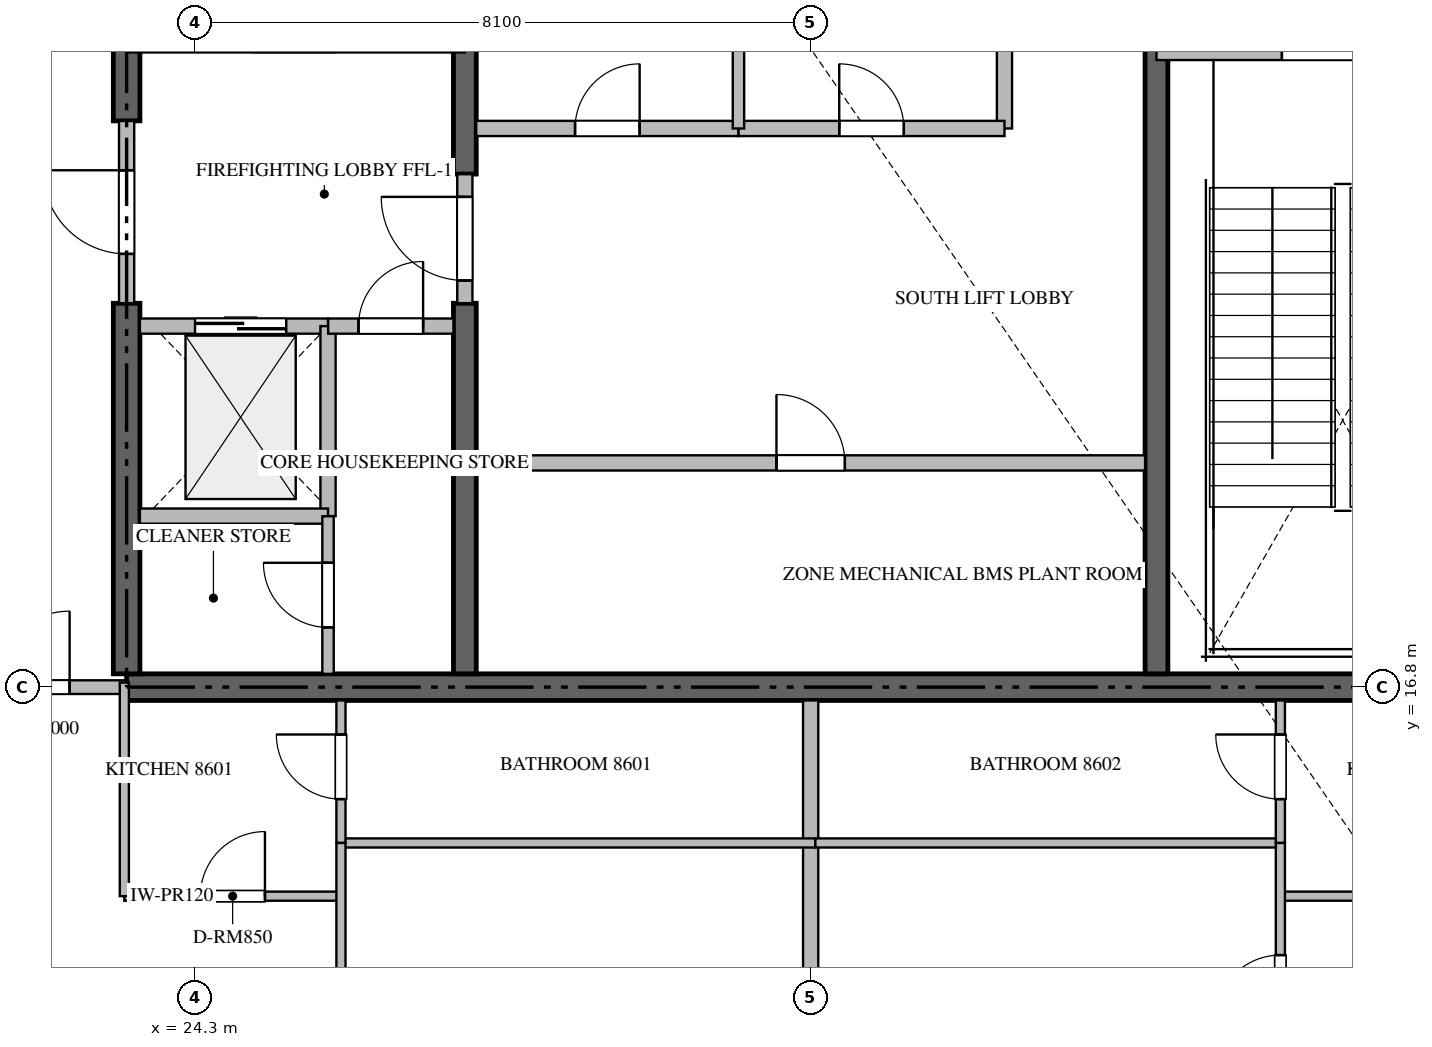
"""IFC4 building model, lengths in metres.
Left out: names, types, materials, properties, quantities, classifications, styles, units other than length and angle.
Written with IfcOpenShell. Run it as: python <this file> out.ifc"""

import sys

from ifc_helpers import new_model, si_unit, direction, frame, frame_2d, origin, place, context, subcontext, project, spatial, rectangle, extrude, source, transform, mapped, element, fill, save


model = new_model("IFC4")
c1 = context("Model", 3, precision=1e-05, world=origin(), true_north=direction((0.0, 1.0)))
c2 = subcontext(c1, "Body", "Model", "MODEL_VIEW")
j1 = project(units=[si_unit("LENGTHUNIT", "METRE"), si_unit("PLANEANGLEUNIT", "RADIAN")], contexts=[c1])
p1 = place(None, origin())
s1 = spatial("IfcSite", under=j1, at=p1, CompositionType="ELEMENT")
p2 = place(p1, origin())
s2 = spatial("IfcBuilding", under=s1, at=p2, CompositionType="ELEMENT")
p3 = place(p2, frame((0.0, 0.0, 347.95)))
s3 = spatial("IfcBuildingStorey", under=s2, at=p3, CompositionType="ELEMENT", Elevation=347.95)
p4 = place(p3, frame((23.4, 16.8, -0.26), z_axis=(0.0, 0.0, 1.0), x_axis=(1.0, 0.0, 0.0)))
e1 = element("IfcWall", 1, at=p4, inside=s3, PredefinedType="SHEAR", context=c2, shape_type="SweptSolid", body=[
    extrude(rectangle(XDim=18.0, YDim=0.35, at=frame_2d((9.0, 0.0))), origin(), (0.0, 0.0, 1.0), 5.898),
])
p5 = place(p3, frame((23.4, 16.975, -0.26), z_axis=(0.0, 0.0, 1.0), x_axis=(0.0, 1.0, 0.0)))
e2 = element("IfcWall", 2, at=p5, inside=s3, PredefinedType="SHEAR", context=c2, shape_type="SweptSolid", body=[
    extrude(rectangle(XDim=4.875, YDim=0.35, at=frame_2d((2.438, 0.0))), origin(), (0.0, 0.0, 1.0), 5.898),
])
p6 = place(p3, frame((23.4, 24.25, -0.26), z_axis=(0.0, 0.0, 1.0), x_axis=(0.0, 1.0, 0.0)))
e3 = element("IfcWall", 3, at=p6, inside=s3, PredefinedType="SHEAR", context=c2, shape_type="SweptSolid", body=[
    extrude(rectangle(XDim=9.175, YDim=0.35, at=frame_2d((4.587, 0.0))), origin(), (0.0, 0.0, 1.0), 5.898),
])
p7 = place(p3, frame((27.85, 16.975, -0.26), z_axis=(0.0, 0.0, 1.0), x_axis=(0.0, 1.0, 0.0)))
e4 = element("IfcWall", 4, at=p7, inside=s3, PredefinedType="SHEAR", context=c2, shape_type="SweptSolid", body=[
    extrude(rectangle(XDim=4.875, YDim=0.3, at=frame_2d((2.438, 0.0))), origin(), (0.0, 0.0, 1.0), 5.898),
])
p8 = place(p3, frame((27.85, 23.55, -0.26), z_axis=(0.0, 0.0, 1.0), x_axis=(0.0, 1.0, 0.0)))
e5 = element("IfcWall", 5, at=p8, inside=s3, PredefinedType="SHEAR", context=c2, shape_type="SweptSolid", body=[
    extrude(rectangle(XDim=9.875, YDim=0.3, at=frame_2d((4.938, 0.0))), origin(), (0.0, 0.0, 1.0), 5.898),
])
p9 = place(p3, frame((36.95, 16.975, -0.26), z_axis=(0.0, 0.0, 1.0), x_axis=(0.0, 1.0, 0.0)))
e6 = element("IfcWall", 6, at=p9, inside=s3, PredefinedType="SHEAR", context=c2, shape_type="SweptSolid", body=[
    extrude(rectangle(XDim=8.375, YDim=0.3, at=frame_2d((4.188, 0.0))), origin(), (0.0, 0.0, 1.0), 5.898),
])
p10 = place(p3, frame((36.95, 25.15, 0.0), z_axis=(0.0, 0.0, 1.0), x_axis=(1.0, 0.0, 0.0)))
e7 = element("IfcWall", 7, at=p10, inside=s3, PredefinedType="STANDARD", context=c2, shape_type="SweptSolid", body=[
    extrude(rectangle(XDim=4.45, YDim=0.2, at=frame_2d((2.225, 0.0))), origin(), (0.0, 0.0, 1.0), 5.64),
])
p11 = place(p10, frame((1.65, 0.0, 0.0)))
e8 = element("IfcOpeningElement", 8, at=p11, cuts=e7, PredefinedType="OPENING", context=c2, shape_type="SweptSolid", body=[
    extrude(rectangle(XDim=1.1, YDim=2.15, at=frame_2d((0.55, 1.075))), frame((0.0, 0.11, 0.0), z_axis=(0.0, -1.0, 0.0), x_axis=(1.0, 0.0, 0.0)), (0.0, 0.0, 1.0), 0.22),
])
p12 = place(p3, frame((23.575, 21.55, 0.0), z_axis=(0.0, 0.0, 1.0), x_axis=(1.0, 0.0, 0.0)))
e9 = element("IfcWall", 9, at=p12, inside=s3, PredefinedType="STANDARD", context=c2, shape_type="SweptSolid", body=[
    extrude(rectangle(XDim=2.475, YDim=0.2, at=frame_2d((1.238, 0.0))), origin(), (0.0, 0.0, 1.0), 5.64),
])
p13 = place(p12, frame((0.725, 0.0, 0.0)))
e10 = element("IfcOpeningElement", 10, at=p13, cuts=e9, PredefinedType="OPENING", context=c2, shape_type="SweptSolid", body=[
    extrude(rectangle(XDim=1.2, YDim=2.2, at=frame_2d((0.6, 1.1))), frame((0.0, 0.11, 0.0), z_axis=(0.0, -1.0, 0.0), x_axis=(1.0, 0.0, 0.0)), (0.0, 0.0, 1.0), 0.22),
])
p14 = place(p3, frame((26.05, 19.05, 0.0), z_axis=(0.0, 0.0, 1.0), x_axis=(0.0, 1.0, 0.0)))
e11 = element("IfcWall", 11, at=p14, inside=s3, PredefinedType="STANDARD", context=c2, shape_type="SweptSolid", body=[
    extrude(rectangle(XDim=2.5, YDim=0.2, at=frame_2d((1.25, 0.0))), origin(), (0.0, 0.0, 1.0), 5.64),
])
p15 = place(p3, frame((23.575, 19.05, 0.0), z_axis=(0.0, 0.0, 1.0), x_axis=(1.0, 0.0, 0.0)))
e12 = element("IfcWall", 12, at=p15, inside=s3, PredefinedType="STANDARD", context=c2, shape_type="SweptSolid", body=[
    extrude(rectangle(XDim=2.475, YDim=0.2, at=frame_2d((1.238, 0.0))), origin(), (0.0, 0.0, 1.0), 5.64),
])
p16 = place(p3, frame((26.052, 21.55, 0.0), z_axis=(0.0, 0.0, 1.0), x_axis=(1.0, 0.0, 0.0)))
e13 = element("IfcWall", 13, at=p16, inside=s3, PredefinedType="STANDARD", context=c2, shape_type="SweptSolid", body=[
    extrude(rectangle(XDim=1.648, YDim=0.2, at=frame_2d((0.824, 0.0))), origin(), (0.0, 0.0, 1.0), 5.64),
])
p17 = place(p16, frame((0.399, 0.0, 0.0)))
e14 = element("IfcOpeningElement", 14, at=p17, cuts=e13, PredefinedType="OPENING", context=c2, shape_type="SweptSolid", body=[
    extrude(rectangle(XDim=0.85, YDim=2.1, at=frame_2d((0.425, 1.05))), frame((0.0, 0.11, 0.0), z_axis=(0.0, -1.0, 0.0), x_axis=(1.0, 0.0, 0.0)), (0.0, 0.0, 1.0), 0.22),
])
p18 = place(p3, frame((23.4, 21.852, 0.0), z_axis=(0.0, 0.0, 1.0), x_axis=(0.0, 1.0, 0.0)))
e15 = element("IfcWall", 15, at=p18, inside=s3, PredefinedType="STANDARD", context=c2, shape_type="SweptSolid", body=[
    extrude(rectangle(XDim=2.396, YDim=0.2, at=frame_2d((1.198, 0.0))), origin(), (0.0, 0.0, 1.0), 5.64),
])
p19 = place(p18, frame((0.648, 0.0, 0.0)))
e16 = element("IfcOpeningElement", 16, at=p19, cuts=e15, PredefinedType="OPENING", context=c2, shape_type="SweptSolid", body=[
    extrude(rectangle(XDim=1.1, YDim=2.15, at=frame_2d((0.55, 1.075))), frame((0.0, 0.11, 0.0), z_axis=(0.0, -1.0, 0.0), x_axis=(1.0, 0.0, 0.0)), (0.0, 0.0, 1.0), 0.22),
])
p20 = place(p3, frame((27.85, 21.852, 0.0), z_axis=(0.0, 0.0, 1.0), x_axis=(0.0, 1.0, 0.0)))
e17 = element("IfcWall", 17, at=p20, inside=s3, PredefinedType="STANDARD", context=c2, shape_type="SweptSolid", body=[
    extrude(rectangle(XDim=1.696, YDim=0.2, at=frame_2d((0.848, 0.0))), origin(), (0.0, 0.0, 1.0), 5.64),
])
p21 = place(p20, frame((0.298, 0.0, 0.0)))
e18 = element("IfcOpeningElement", 18, at=p21, cuts=e17, PredefinedType="OPENING", context=c2, shape_type="SweptSolid", body=[
    extrude(rectangle(XDim=1.1, YDim=2.15, at=frame_2d((0.55, 1.075))), frame((0.0, 0.11, 0.0), z_axis=(0.0, -1.0, 0.0), x_axis=(1.0, 0.0, 0.0)), (0.0, 0.0, 1.0), 0.22),
])
p22 = place(p3, frame((26.05, 16.975, 0.0), z_axis=(0.0, 0.0, 1.0), x_axis=(0.0, 1.0, 0.0)))
e19 = element("IfcWall", 19, at=p22, inside=s3, PredefinedType="PARTITIONING", context=c2, shape_type="SweptSolid", body=[
    extrude(rectangle(XDim=2.073, YDim=0.15, at=frame_2d((1.037, 0.0))), origin(), (0.0, 0.0, 1.0), 5.64),
])
p23 = place(p22, frame((0.611, 0.0, 0.0)))
e20 = element("IfcOpeningElement", 20, at=p23, cuts=e19, PredefinedType="OPENING", context=c2, shape_type="SweptSolid", body=[
    extrude(rectangle(XDim=0.85, YDim=2.1, at=frame_2d((0.425, 1.05))), frame((0.0, 0.085, 0.0), z_axis=(0.0, -1.0, 0.0), x_axis=(1.0, 0.0, 0.0)), (0.0, 0.0, 1.0), 0.17),
])
p24 = place(p3, frame((28.0, 19.75, 0.0), z_axis=(0.0, 0.0, 1.0), x_axis=(1.0, 0.0, 0.0)))
e21 = element("IfcWall", 21, at=p24, inside=s3, PredefinedType="STANDARD", context=c2, shape_type="SweptSolid", body=[
    extrude(rectangle(XDim=8.8, YDim=0.2, at=frame_2d((4.4, 0.0))), origin(), (0.0, 0.0, 1.0), 5.64),
])
p25 = place(p24, frame((3.95, 0.0, 0.0)))
e22 = element("IfcOpeningElement", 22, at=p25, cuts=e21, PredefinedType="OPENING", context=c2, shape_type="SweptSolid", body=[
    extrude(rectangle(XDim=0.9, YDim=2.1, at=frame_2d((0.45, 1.05))), frame((0.0, 0.11, 0.0), z_axis=(0.0, -1.0, 0.0), x_axis=(1.0, 0.0, 0.0)), (0.0, 0.0, 1.0), 0.22),
])
p26 = place(p3, frame((34.95, 24.15, 0.0), z_axis=(0.0, 0.0, 1.0), x_axis=(0.0, 1.0, 0.0)))
e23 = element("IfcWall", 23, at=p26, inside=s3, PredefinedType="STANDARD", context=c2, shape_type="SweptSolid", body=[
    extrude(rectangle(XDim=2.8, YDim=0.2, at=frame_2d((1.4, 0.0))), origin(), (0.0, 0.0, 1.0), 5.64),
])
p27 = place(p3, frame((28.0, 24.15, 0.0), z_axis=(0.0, 0.0, 1.0), x_axis=(1.0, 0.0, 0.0)))
e24 = element("IfcWall", 24, at=p27, inside=s3, PredefinedType="STANDARD", context=c2, shape_type="SweptSolid", body=[
    extrude(rectangle(XDim=3.45, YDim=0.2, at=frame_2d((1.725, 0.0))), origin(), (0.0, 0.0, 1.0), 5.64),
])
p28 = place(p27, frame((1.3, 0.0, 0.0)))
e25 = element("IfcOpeningElement", 25, at=p28, cuts=e24, PredefinedType="OPENING", context=c2, shape_type="SweptSolid", body=[
    extrude(rectangle(XDim=0.85, YDim=2.1, at=frame_2d((0.425, 1.05))), frame((0.0, 0.11, 0.0), z_axis=(0.0, -1.0, 0.0), x_axis=(1.0, 0.0, 0.0)), (0.0, 0.0, 1.0), 0.22),
])
p29 = place(p3, frame((31.452, 24.15, 0.0), z_axis=(0.0, 0.0, 1.0), x_axis=(1.0, 0.0, 0.0)))
e26 = element("IfcWall", 26, at=p29, inside=s3, PredefinedType="STANDARD", context=c2, shape_type="SweptSolid", body=[
    extrude(rectangle(XDim=3.498, YDim=0.2, at=frame_2d((1.749, 0.0))), origin(), (0.0, 0.0, 1.0), 5.64),
])
p30 = place(p29, frame((1.324, 0.0, 0.0)))
e27 = element("IfcOpeningElement", 27, at=p30, cuts=e26, PredefinedType="OPENING", context=c2, shape_type="SweptSolid", body=[
    extrude(rectangle(XDim=0.85, YDim=2.1, at=frame_2d((0.425, 1.05))), frame((0.0, 0.11, 0.0), z_axis=(0.0, -1.0, 0.0), x_axis=(1.0, 0.0, 0.0)), (0.0, 0.0, 1.0), 0.22),
])
p31 = place(p3, frame((31.45, 24.15, 0.0), z_axis=(0.0, 0.0, 1.0), x_axis=(0.0, 1.0, 0.0)))
e28 = element("IfcWall", 28, at=p31, inside=s3, PredefinedType="PARTITIONING", context=c2, shape_type="SweptSolid", body=[
    extrude(rectangle(XDim=2.8, YDim=0.15, at=frame_2d((1.4, 0.0))), origin(), (0.0, 0.0, 1.0), 5.64),
])
p32 = place(p3, frame((32.4, 4.082, 0.0), z_axis=(0.0, 0.0, 1.0), x_axis=(0.0, 1.0, 0.0)))
e29 = element("IfcWall", 29, at=p32, inside=s3, PredefinedType="PARTITIONING", context=c2, shape_type="SweptSolid", body=[
    extrude(rectangle(XDim=12.543, YDim=0.2, at=frame_2d((6.271, 0.0))), origin(), (0.0, 0.0, 1.0), 5.64),
])
p33 = place(p3, frame((20.902, 16.8, 0.0), z_axis=(0.0, 0.0, 1.0), x_axis=(1.0, 0.0, 0.0)))
e30 = element("IfcWall", 30, at=p33, inside=s3, PredefinedType="PARTITIONING", context=c2, shape_type="SweptSolid", body=[
    extrude(rectangle(XDim=2.496, YDim=0.18, at=frame_2d((1.248, 0.0))), origin(), (0.0, 0.0, 1.0), 5.64),
])
p34 = place(p33, frame((0.748, 0.0, 0.0)))
e31 = element("IfcOpeningElement", 31, at=p34, cuts=e30, PredefinedType="OPENING", context=c2, shape_type="SweptSolid", body=[
    extrude(rectangle(XDim=1.0, YDim=2.15, at=frame_2d((0.5, 1.075))), frame((0.0, 0.1, 0.0), z_axis=(0.0, -1.0, 0.0), x_axis=(1.0, 0.0, 0.0)), (0.0, 0.0, 1.0), 0.2),
])
p35 = place(p3, frame((23.37, 14.05, 0.0), z_axis=(0.0, 0.0, 1.0), x_axis=(1.0, 0.0, 0.0)))
e32 = element("IfcWall", 32, at=p35, inside=s3, PredefinedType="PARTITIONING", context=c2, shape_type="SweptSolid", body=[
    extrude(rectangle(XDim=2.85, YDim=0.12, at=frame_2d((1.425, 0.0))), origin(), (0.0, 0.0, 1.0), 5.64),
])
p36 = place(p35, frame((1.0, 0.0, 0.0)))
e33 = element("IfcOpeningElement", 33, at=p36, cuts=e32, PredefinedType="OPENING", context=c2, shape_type="SweptSolid", body=[
    extrude(rectangle(XDim=0.85, YDim=2.1, at=frame_2d((0.425, 1.05))), frame((0.0, 0.07, 0.0), z_axis=(0.0, -1.0, 0.0), x_axis=(1.0, 0.0, 0.0)), (0.0, 0.0, 1.0), 0.14),
])
p37 = place(p3, frame((23.37, 14.05, 0.0), z_axis=(0.0, 0.0, 1.0), x_axis=(0.0, 1.0, 0.0)))
e34 = element("IfcWall", 34, at=p37, inside=s3, PredefinedType="PARTITIONING", context=c2, shape_type="SweptSolid", body=[
    extrude(rectangle(XDim=2.81, YDim=0.12, at=frame_2d((1.405, 0.0))), origin(), (0.0, 0.0, 1.0), 5.64),
])
p38 = place(p3, frame((26.22, 14.75, 0.0), z_axis=(0.0, 0.0, 1.0), x_axis=(1.0, 0.0, 0.0)))
e35 = element("IfcWall", 35, at=p38, inside=s3, PredefinedType="PARTITIONING", context=c2, shape_type="SweptSolid", body=[
    extrude(rectangle(XDim=6.24, YDim=0.12, at=frame_2d((3.12, 0.0))), origin(), (0.0, 0.0, 1.0), 5.64),
])
p39 = place(p3, frame((26.22, 9.017, 0.0), z_axis=(0.0, 0.0, 1.0), x_axis=(0.0, 1.0, 0.0)))
e36 = element("IfcWall", 36, at=p39, inside=s3, PredefinedType="PARTITIONING", context=c2, shape_type="SweptSolid", body=[
    extrude(rectangle(XDim=5.733, YDim=0.12, at=frame_2d((2.866, 0.0))), origin(), (0.0, 0.0, 1.0), 5.64),
])
p40 = place(p39, frame((2.442, 0.0, 0.0)))
e37 = element("IfcOpeningElement", 37, at=p40, cuts=e36, PredefinedType="OPENING", context=c2, shape_type="SweptSolid", body=[
    extrude(rectangle(XDim=0.85, YDim=2.1, at=frame_2d((0.425, 1.05))), frame((0.0, 0.07, 0.0), z_axis=(0.0, -1.0, 0.0), x_axis=(1.0, 0.0, 0.0)), (0.0, 0.0, 1.0), 0.14),
])
p41 = place(p3, frame((26.22, 14.752, 0.0), z_axis=(0.0, 0.0, 1.0), x_axis=(0.0, 1.0, 0.0)))
e38 = element("IfcWall", 38, at=p41, inside=s3, PredefinedType="PARTITIONING", context=c2, shape_type="SweptSolid", body=[
    extrude(rectangle(XDim=1.873, YDim=0.12, at=frame_2d((0.937, 0.0))), origin(), (0.0, 0.0, 1.0), 5.64),
])
p42 = place(p41, frame((0.575, 0.0, 0.0)))
e39 = element("IfcOpeningElement", 39, at=p42, cuts=e38, PredefinedType="OPENING", context=c2, shape_type="SweptSolid", body=[
    extrude(rectangle(XDim=0.85, YDim=2.1, at=frame_2d((0.425, 1.05))), frame((0.0, 0.07, 0.0), z_axis=(0.0, -1.0, 0.0), x_axis=(1.0, 0.0, 0.0)), (0.0, 0.0, 1.0), 0.14),
])
p43 = place(p3, frame((38.58, 14.05, 0.0), z_axis=(0.0, 0.0, 1.0), x_axis=(1.0, 0.0, 0.0)))
e40 = element("IfcWall", 40, at=p43, inside=s3, PredefinedType="PARTITIONING", context=c2, shape_type="SweptSolid", body=[
    extrude(rectangle(XDim=2.85, YDim=0.12, at=frame_2d((1.425, 0.0))), origin(), (0.0, 0.0, 1.0), 5.64),
])
p44 = place(p43, frame((1.0, 0.0, 0.0)))
e41 = element("IfcOpeningElement", 41, at=p44, cuts=e40, PredefinedType="OPENING", context=c2, shape_type="SweptSolid", body=[
    extrude(rectangle(XDim=0.85, YDim=2.1, at=frame_2d((0.425, 1.05))), frame((0.0, 0.07, 0.0), z_axis=(0.0, -1.0, 0.0), x_axis=(1.0, 0.0, 0.0)), (0.0, 0.0, 1.0), 0.14),
])
p45 = place(p3, frame((32.462, 14.75, 0.0), z_axis=(0.0, 0.0, 1.0), x_axis=(1.0, 0.0, 0.0)))
e42 = element("IfcWall", 42, at=p45, inside=s3, PredefinedType="PARTITIONING", context=c2, shape_type="SweptSolid", body=[
    extrude(rectangle(XDim=6.118, YDim=0.12, at=frame_2d((3.059, 0.0))), origin(), (0.0, 0.0, 1.0), 5.64),
])
p46 = place(p3, frame((38.58, 10.949, 0.0), z_axis=(0.0, 0.0, 1.0), x_axis=(0.0, 1.0, 0.0)))
e43 = element("IfcWall", 43, at=p46, inside=s3, PredefinedType="PARTITIONING", context=c2, shape_type="SweptSolid", body=[
    extrude(rectangle(XDim=3.801, YDim=0.12, at=frame_2d((1.9, 0.0))), origin(), (0.0, 0.0, 1.0), 5.64),
])
p47 = place(p46, frame((1.476, 0.0, 0.0)))
e44 = element("IfcOpeningElement", 44, at=p47, cuts=e43, PredefinedType="OPENING", context=c2, shape_type="SweptSolid", body=[
    extrude(rectangle(XDim=0.85, YDim=2.1, at=frame_2d((0.425, 1.05))), frame((0.0, 0.07, 0.0), z_axis=(0.0, -1.0, 0.0), x_axis=(1.0, 0.0, 0.0)), (0.0, 0.0, 1.0), 0.14),
])
p48 = place(p3, frame((38.58, 14.752, 0.0), z_axis=(0.0, 0.0, 1.0), x_axis=(0.0, 1.0, 0.0)))
e45 = element("IfcWall", 45, at=p48, inside=s3, PredefinedType="PARTITIONING", context=c2, shape_type="SweptSolid", body=[
    extrude(rectangle(XDim=1.873, YDim=0.12, at=frame_2d((0.937, 0.0))), origin(), (0.0, 0.0, 1.0), 5.64),
])
p49 = place(p48, frame((0.575, 0.0, 0.0)))
e46 = element("IfcOpeningElement", 46, at=p49, cuts=e45, PredefinedType="OPENING", context=c2, shape_type="SweptSolid", body=[
    extrude(rectangle(XDim=0.85, YDim=2.1, at=frame_2d((0.425, 1.05))), frame((0.0, 0.07, 0.0), z_axis=(0.0, -1.0, 0.0), x_axis=(1.0, 0.0, 0.0)), (0.0, 0.0, 1.0), 0.14),
])
m1 = source(origin(), c2, "Body", "SweptSolid", [
    extrude(rectangle(XDim=1.1, YDim=2.15, at=frame_2d((0.55, 1.075))), frame((0.0, 0.025, 0.0), z_axis=(0.0, -1.0, 0.0), x_axis=(1.0, 0.0, 0.0)), (0.0, 0.0, 1.0), 0.05),
])
p50 = place(p11, origin())
e47 = element("IfcDoor", 47, at=p50, inside=s3, OperationType="SINGLE_SWING_LEFT", PredefinedType="DOOR", context=c2, shape_type="MappedRepresentation", body=[
    mapped(m1, transform((0.0, 0.0, 0.0), scale=1.0)),
])
fill(e8, e47)
m2 = source(origin(), c2, "Body", "SweptSolid", [
    extrude(rectangle(XDim=1.2, YDim=2.2, at=frame_2d((0.6, 1.1))), frame((0.0, 0.025, 0.0), z_axis=(0.0, -1.0, 0.0), x_axis=(1.0, 0.0, 0.0)), (0.0, 0.0, 1.0), 0.05),
])
p51 = place(p13, origin())
e48 = element("IfcDoor", 48, at=p51, inside=s3, OperationType="DOUBLE_DOOR_SLIDING", PredefinedType="DOOR", context=c2, shape_type="MappedRepresentation", body=[
    mapped(m2, transform((0.0, 0.0, 0.0), scale=1.0)),
])
fill(e10, e48)
m3 = source(origin(), c2, "Body", "SweptSolid", [
    extrude(rectangle(XDim=0.85, YDim=2.1, at=frame_2d((0.425, 1.05))), frame((0.0, 0.025, 0.0), z_axis=(0.0, -1.0, 0.0), x_axis=(1.0, 0.0, 0.0)), (0.0, 0.0, 1.0), 0.05),
])
p52 = place(p17, origin())
e49 = element("IfcDoor", 49, at=p52, inside=s3, OperationType="SINGLE_SWING_RIGHT", PredefinedType="DOOR", context=c2, shape_type="MappedRepresentation", body=[
    mapped(m3, transform((0.0, 0.0, 0.0), scale=1.0)),
])
fill(e14, e49)
p53 = place(p19, origin())
e50 = element("IfcDoor", 50, at=p53, inside=s3, OperationType="SINGLE_SWING_RIGHT", PredefinedType="DOOR", context=c2, shape_type="MappedRepresentation", body=[
    mapped(m1, transform((0.0, 0.0, 0.0), scale=1.0)),
])
fill(e16, e50)
p54 = place(p21, origin())
e51 = element("IfcDoor", 51, at=p54, inside=s3, OperationType="SINGLE_SWING_RIGHT", PredefinedType="DOOR", context=c2, shape_type="MappedRepresentation", body=[
    mapped(m1, transform((0.0, 0.0, 0.0), scale=1.0)),
])
fill(e18, e51)
p55 = place(p23, origin())
e52 = element("IfcDoor", 52, at=p55, inside=s3, OperationType="SINGLE_SWING_RIGHT", PredefinedType="DOOR", context=c2, shape_type="MappedRepresentation", body=[
    mapped(m3, transform((0.0, 0.0, 0.0), scale=1.0)),
])
fill(e20, e52)
m4 = source(origin(), c2, "Body", "SweptSolid", [
    extrude(rectangle(XDim=0.9, YDim=2.1, at=frame_2d((0.45, 1.05))), frame((0.0, 0.025, 0.0), z_axis=(0.0, -1.0, 0.0), x_axis=(1.0, 0.0, 0.0)), (0.0, 0.0, 1.0), 0.05),
])
p56 = place(p25, origin())
e53 = element("IfcDoor", 53, at=p56, inside=s3, OperationType="SINGLE_SWING_LEFT", PredefinedType="DOOR", context=c2, shape_type="MappedRepresentation", body=[
    mapped(m4, transform((0.0, 0.0, 0.0), scale=1.0)),
])
fill(e22, e53)
p57 = place(p28, origin())
e54 = element("IfcDoor", 54, at=p57, inside=s3, OperationType="SINGLE_SWING_RIGHT", PredefinedType="DOOR", context=c2, shape_type="MappedRepresentation", body=[
    mapped(m3, transform((0.0, 0.0, 0.0), scale=1.0)),
])
fill(e25, e54)
p58 = place(p30, origin())
e55 = element("IfcDoor", 55, at=p58, inside=s3, OperationType="SINGLE_SWING_LEFT", PredefinedType="DOOR", context=c2, shape_type="MappedRepresentation", body=[
    mapped(m3, transform((0.0, 0.0, 0.0), scale=1.0)),
])
fill(e27, e55)
m5 = source(origin(), c2, "Body", "SweptSolid", [
    extrude(rectangle(XDim=1.0, YDim=2.15, at=frame_2d((0.5, 1.075))), frame((0.0, 0.025, 0.0), z_axis=(0.0, -1.0, 0.0), x_axis=(1.0, 0.0, 0.0)), (0.0, 0.0, 1.0), 0.05),
])
p59 = place(p34, origin())
e56 = element("IfcDoor", 56, at=p59, inside=s3, OperationType="SINGLE_SWING_RIGHT", PredefinedType="DOOR", context=c2, shape_type="MappedRepresentation", body=[
    mapped(m5, transform((0.0, 0.0, 0.0), scale=1.0)),
])
fill(e31, e56)
p60 = place(p36, origin())
e57 = element("IfcDoor", 57, at=p60, inside=s3, OperationType="SINGLE_SWING_RIGHT", PredefinedType="DOOR", context=c2, shape_type="MappedRepresentation", body=[
    mapped(m3, transform((0.0, 0.0, 0.0), scale=1.0)),
])
fill(e33, e57)
p61 = place(p42, origin())
e58 = element("IfcDoor", 58, at=p61, inside=s3, OperationType="SINGLE_SWING_RIGHT", PredefinedType="DOOR", context=c2, shape_type="MappedRepresentation", body=[
    mapped(m3, transform((0.0, 0.0, 0.0), scale=1.0)),
])
fill(e39, e58)
p62 = place(p47, origin())
e59 = element("IfcDoor", 59, at=p62, inside=s3, OperationType="SINGLE_SWING_LEFT", PredefinedType="DOOR", context=c2, shape_type="MappedRepresentation", body=[
    mapped(m3, transform((0.0, 0.0, 0.0), scale=1.0)),
])
fill(e44, e59)
p63 = place(p49, origin())
e60 = element("IfcDoor", 60, at=p63, inside=s3, OperationType="SINGLE_SWING_RIGHT", PredefinedType="DOOR", context=c2, shape_type="MappedRepresentation", body=[
    mapped(m3, transform((0.0, 0.0, 0.0), scale=1.0)),
])
fill(e46, e60)
save(model, sys.argv[1])
